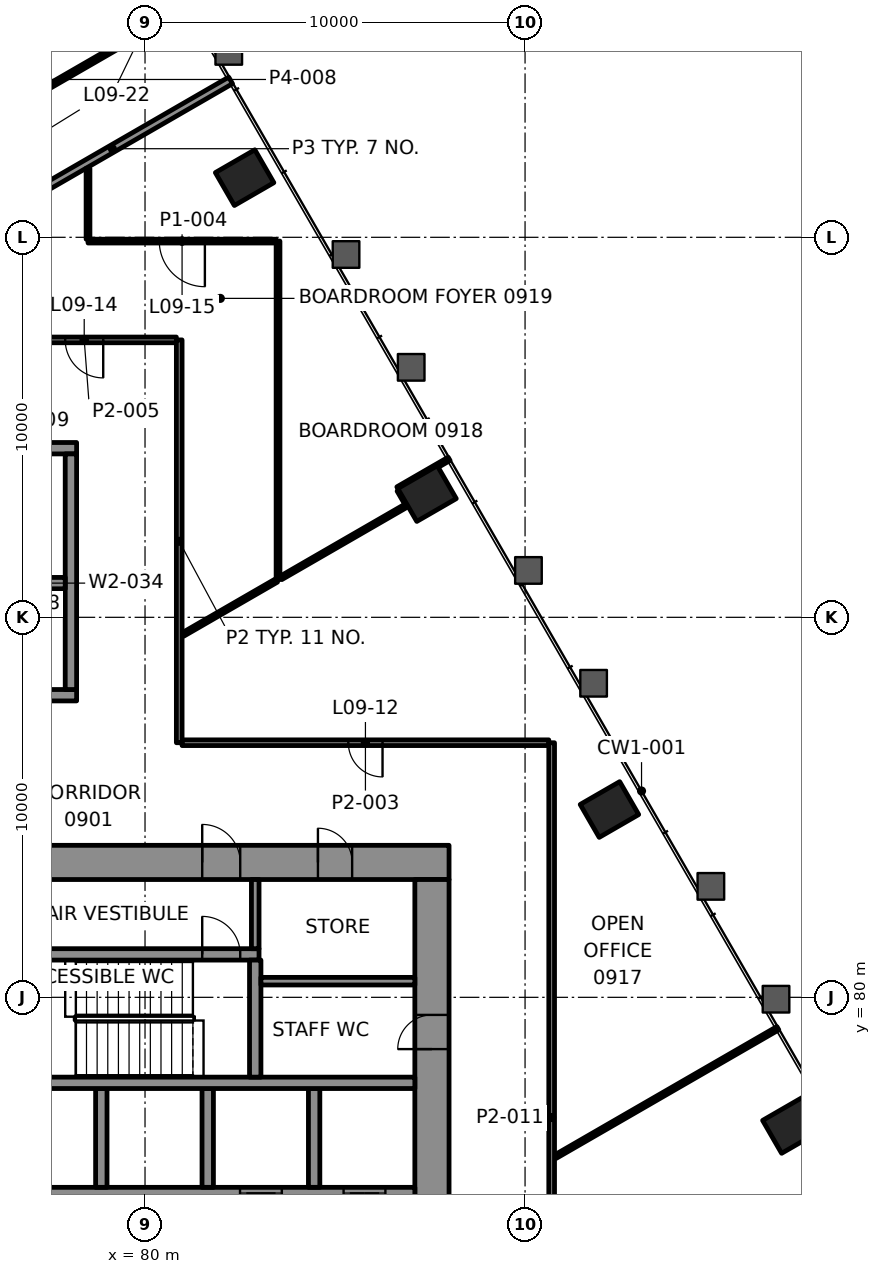
"""IFC4 building model, lengths in metres.
Left out: names, types, materials, properties, quantities, classifications, styles, units other than length and angle.
Written with IfcOpenShell. Run it as: python <this file> out.ifc"""

import sys

from ifc_helpers import new_model, si_unit, direction, frame, frame_2d, origin, origin_2d, place, context, subcontext, project, spatial, rectangle, extrude, element, fill, save


model = new_model("IFC4")
c1 = context("Model", 3, precision=1e-05, world=origin(), true_north=direction((0.0, 1.0)))
c2 = subcontext(c1, "Body", "Model", "MODEL_VIEW")
j1 = project(units=[si_unit("LENGTHUNIT", "METRE"), si_unit("PLANEANGLEUNIT", "RADIAN")], contexts=[c1])
p1 = place(None, origin())
s1 = spatial("IfcSite", under=j1, at=p1, CompositionType="ELEMENT")
p2 = place(p1, origin())
s2 = spatial("IfcBuilding", under=s1, at=p2, CompositionType="ELEMENT")
p3 = place(p2, frame((0.0, 0.0, 44.2)))
s3 = spatial("IfcBuildingStorey", under=s2, at=p3, CompositionType="ELEMENT", Elevation=44.2)
for number, where, z_axis, x_axis in (
    (1, (97.021, 76.628, -0.0), (0.0, 0.0, 1.0), (-0.5, 0.866, 0.0)),
    (2, (92.22, 84.942, -0.0), (0.0, 0.0, 1.0), (-0.5, 0.866, 0.0)),
    (3, (87.421, 93.256, -0.0), (0.0, 0.0, 1.0), (-0.5, 0.866, 0.0)),
    (4, (82.621, 101.57, -0.0), (0.0, 0.0, 1.0), (-0.5, 0.866, 0.0)),
):
    element("IfcColumn", number, at=place(p3, frame(where, z_axis=z_axis, x_axis=x_axis)), inside=s3, PredefinedType="COLUMN", context=c2, shape_type="SweptSolid", body=[
        extrude(rectangle(XDim=1.0, YDim=1.2, at=origin_2d()), origin(), (0.0, 0.0, 1.0), 4.2),
    ])
p4 = place(p3, frame((62.9, 83.55, 0.0), z_axis=(0.0, 0.0, 1.0), x_axis=(1.0, 0.0, 0.0)))
e5 = element("IfcWall", 5, at=p4, inside=s3, PredefinedType="SHEAR", context=c2, shape_type="SweptSolid", body=[
    extrude(rectangle(XDim=25.1, YDim=0.9, at=frame_2d((12.55, 0.0))), origin(), (0.0, 0.0, 1.0), 4.0),
])
p5 = place(p4, frame((4.795, 0.0, 0.0)))
e6 = element("IfcOpeningElement", 6, at=p5, cuts=e5, PredefinedType="OPENING", context=c2, shape_type="SweptSolid", body=[
    extrude(rectangle(XDim=1.0, YDim=2.1, at=frame_2d((0.5, 1.05))), frame((0.0, 0.46, 0.0), z_axis=(0.0, -1.0, 0.0), x_axis=(1.0, 0.0, 0.0)), (0.0, 0.0, 1.0), 0.92),
])
p6 = place(p4, frame((18.605, 0.0, 0.0)))
e7 = element("IfcOpeningElement", 7, at=p6, cuts=e5, PredefinedType="OPENING", context=c2, shape_type="SweptSolid", body=[
    extrude(rectangle(XDim=1.0, YDim=2.1, at=frame_2d((0.5, 1.05))), frame((0.0, 0.46, 0.0), z_axis=(0.0, -1.0, 0.0), x_axis=(1.0, 0.0, 0.0)), (0.0, 0.0, 1.0), 0.92),
])
p7 = place(p4, frame((2.55, 0.0, 0.0)))
e8 = element("IfcOpeningElement", 8, at=p7, cuts=e5, PredefinedType="OPENING", context=c2, shape_type="SweptSolid", body=[
    extrude(rectangle(XDim=0.9, YDim=2.1, at=frame_2d((0.45, 1.05))), frame((0.0, 0.46, 0.0), z_axis=(0.0, -1.0, 0.0), x_axis=(1.0, 0.0, 0.0)), (0.0, 0.0, 1.0), 0.92),
])
p8 = place(p4, frame((11.75, 0.0, 0.0)))
e9 = element("IfcOpeningElement", 9, at=p8, cuts=e5, PredefinedType="OPENING", context=c2, shape_type="SweptSolid", body=[
    extrude(rectangle(XDim=0.9, YDim=2.1, at=frame_2d((0.45, 1.05))), frame((0.0, 0.46, 0.0), z_axis=(0.0, -1.0, 0.0), x_axis=(1.0, 0.0, 0.0)), (0.0, 0.0, 1.0), 0.92),
])
p9 = place(p4, frame((21.65, 0.0, 0.0)))
e10 = element("IfcOpeningElement", 10, at=p9, cuts=e5, PredefinedType="OPENING", context=c2, shape_type="SweptSolid", body=[
    extrude(rectangle(XDim=0.9, YDim=2.1, at=frame_2d((0.45, 1.05))), frame((0.0, 0.46, 0.0), z_axis=(0.0, -1.0, 0.0), x_axis=(1.0, 0.0, 0.0)), (0.0, 0.0, 1.0), 0.92),
])
p10 = place(p3, frame((87.55, 66.9, 0.0), z_axis=(0.0, 0.0, 1.0), x_axis=(0.0, 1.0, 0.0)))
e11 = element("IfcWall", 11, at=p10, inside=s3, PredefinedType="SHEAR", context=c2, shape_type="SweptSolid", body=[
    extrude(rectangle(XDim=16.2, YDim=0.9, at=frame_2d((8.1, 0.0))), origin(), (0.0, 0.0, 1.0), 4.0),
])
p11 = place(p10, frame((5.5, 0.0, 0.0)))
e12 = element("IfcOpeningElement", 12, at=p11, cuts=e11, PredefinedType="OPENING", context=c2, shape_type="SweptSolid", body=[
    extrude(rectangle(XDim=1.8, YDim=2.1, at=frame_2d((0.9, 1.05))), frame((0.0, 0.46, 0.0), z_axis=(0.0, -1.0, 0.0), x_axis=(1.0, 0.0, 0.0)), (0.0, 0.0, 1.0), 0.92),
])
p12 = place(p10, frame((11.738, 0.0, 0.0)))
e13 = element("IfcOpeningElement", 13, at=p12, cuts=e11, PredefinedType="OPENING", context=c2, shape_type="SweptSolid", body=[
    extrude(rectangle(XDim=0.9, YDim=2.1, at=frame_2d((0.45, 1.05))), frame((0.0, 0.46, 0.0), z_axis=(0.0, -1.0, 0.0), x_axis=(1.0, 0.0, 0.0)), (0.0, 0.0, 1.0), 0.92),
])
p13 = place(p3, frame((70.3, 74.85, 0.0), z_axis=(0.0, 0.0, 1.0), x_axis=(1.0, 0.0, 0.0)))
e14 = element("IfcWall", 14, at=p13, inside=s3, PredefinedType="SHEAR", context=c2, shape_type="SweptSolid", body=[
    extrude(rectangle(XDim=16.8, YDim=0.3, at=frame_2d((8.4, 0.0))), origin(), (0.0, 0.0, 1.0), 4.0),
])
p14 = place(p13, frame((3.8, 0.0, 0.0)))
e15 = element("IfcOpeningElement", 15, at=p14, cuts=e14, PredefinedType="OPENING", context=c2, shape_type="SweptSolid", body=[
    extrude(rectangle(XDim=1.1, YDim=2.1, at=frame_2d((0.55, 1.05))), frame((0.0, 0.16, 0.0), z_axis=(0.0, -1.0, 0.0), x_axis=(1.0, 0.0, 0.0)), (0.0, 0.0, 1.0), 0.32),
])
p15 = place(p13, frame((12.2, 0.0, 0.0)))
e16 = element("IfcOpeningElement", 16, at=p15, cuts=e14, PredefinedType="OPENING", context=c2, shape_type="SweptSolid", body=[
    extrude(rectangle(XDim=1.1, YDim=2.1, at=frame_2d((0.55, 1.05))), frame((0.0, 0.16, 0.0), z_axis=(0.0, -1.0, 0.0), x_axis=(1.0, 0.0, 0.0)), (0.0, 0.0, 1.0), 0.32),
])
p16 = place(p13, frame((14.925, 0.0, 0.0)))
e17 = element("IfcOpeningElement", 17, at=p16, cuts=e14, PredefinedType="OPENING", context=c2, shape_type="SweptSolid", body=[
    extrude(rectangle(XDim=1.1, YDim=2.1, at=frame_2d((0.55, 1.05))), frame((0.0, 0.16, 0.0), z_axis=(0.0, -1.0, 0.0), x_axis=(1.0, 0.0, 0.0)), (0.0, 0.0, 1.0), 0.32),
])
for number, where, z_axis, x_axis in (
    (18, (78.85, 75.0, 0.0), (0.0, 0.0, 1.0), (0.0, 1.0, 0.0)),
    (19, (81.65, 75.0, 0.0), (0.0, 0.0, 1.0), (0.0, 1.0, 0.0)),
    (20, (84.45, 75.0, 0.0), (0.0, 0.0, 1.0), (0.0, 1.0, 0.0)),
):
    element("IfcWall", number, at=place(p3, frame(where, z_axis=z_axis, x_axis=x_axis)), inside=s3, PredefinedType="SHEAR", context=c2, shape_type="SweptSolid", body=[
        extrude(rectangle(XDim=2.6, YDim=0.3, at=frame_2d((1.3, 0.0))), origin(), (0.0, 0.0, 1.0), 4.0),
    ])
p17 = place(p3, frame((64.35, 77.75, 0.0), z_axis=(0.0, 0.0, 1.0), x_axis=(1.0, 0.0, 0.0)))
e21 = element("IfcWall", 21, at=p17, inside=s3, PredefinedType="SHEAR", context=c2, shape_type="SweptSolid", body=[
    extrude(rectangle(XDim=22.75, YDim=0.3, at=frame_2d((11.375, 0.0))), origin(), (0.0, 0.0, 1.0), 4.0),
])
p18 = place(p17, frame((3.345, 0.0, 0.0)))
e22 = element("IfcOpeningElement", 22, at=p18, cuts=e21, PredefinedType="OPENING", context=c2, shape_type="SweptSolid", body=[
    extrude(rectangle(XDim=1.0, YDim=2.1, at=frame_2d((0.5, 1.05))), frame((0.0, 0.16, 0.0), z_axis=(0.0, -1.0, 0.0), x_axis=(1.0, 0.0, 0.0)), (0.0, 0.0, 1.0), 0.32),
])
p19 = place(p3, frame((76.14, 81.13, 0.0), z_axis=(0.0, 0.0, 1.0), x_axis=(1.0, 0.0, 0.0)))
e23 = element("IfcWall", 23, at=p19, inside=s3, PredefinedType="SHEAR", context=c2, shape_type="SweptSolid", body=[
    extrude(rectangle(XDim=6.86, YDim=0.3, at=frame_2d((3.43, 0.0))), origin(), (0.0, 0.0, 1.0), 4.0),
])
p20 = place(p19, frame((5.365, 0.0, 0.0)))
e24 = element("IfcOpeningElement", 24, at=p20, cuts=e23, PredefinedType="OPENING", context=c2, shape_type="SweptSolid", body=[
    extrude(rectangle(XDim=1.0, YDim=2.1, at=frame_2d((0.5, 1.05))), frame((0.0, 0.16, 0.0), z_axis=(0.0, -1.0, 0.0), x_axis=(1.0, 0.0, 0.0)), (0.0, 0.0, 1.0), 0.32),
])
p21 = place(p3, frame((82.9, 77.9, 0.0), z_axis=(0.0, 0.0, 1.0), x_axis=(0.0, 1.0, 0.0)))
e25 = element("IfcWall", 25, at=p21, inside=s3, PredefinedType="SHEAR", context=c2, shape_type="SweptSolid", body=[
    extrude(rectangle(XDim=3.08, YDim=0.3, at=frame_2d((1.54, 0.0))), origin(), (0.0, 0.0, 1.0), 4.0),
])
p22 = place(p3, frame((71.8, 87.95, 0.0), z_axis=(0.0, 0.0, 1.0), x_axis=(1.0, 0.0, 0.0)))
e26 = element("IfcWall", 26, at=p22, inside=s3, PredefinedType="SHEAR", context=c2, shape_type="SweptSolid", body=[
    extrude(rectangle(XDim=6.4, YDim=0.3, at=frame_2d((3.2, 0.0))), origin(), (0.0, 0.0, 1.0), 4.0),
])
p23 = place(p22, frame((1.325, 0.0, 0.0)))
e27 = element("IfcOpeningElement", 27, at=p23, cuts=e26, PredefinedType="OPENING", context=c2, shape_type="SweptSolid", body=[
    extrude(rectangle(XDim=1.0, YDim=2.1, at=frame_2d((0.5, 1.05))), frame((0.0, 0.16, 0.0), z_axis=(0.0, -1.0, 0.0), x_axis=(1.0, 0.0, 0.0)), (0.0, 0.0, 1.0), 0.32),
])
p24 = place(p22, frame((4.125, 0.0, 0.0)))
e28 = element("IfcOpeningElement", 28, at=p24, cuts=e26, PredefinedType="OPENING", context=c2, shape_type="SweptSolid", body=[
    extrude(rectangle(XDim=1.2, YDim=2.1, at=frame_2d((0.6, 1.05))), frame((0.0, 0.16, 0.0), z_axis=(0.0, -1.0, 0.0), x_axis=(1.0, 0.0, 0.0)), (0.0, 0.0, 1.0), 0.32),
])
p25 = place(p3, frame((71.8, 94.45, 0.0), z_axis=(0.0, 0.0, 1.0), x_axis=(1.0, 0.0, 0.0)))
e29 = element("IfcWall", 29, at=p25, inside=s3, PredefinedType="SHEAR", context=c2, shape_type="SweptSolid", body=[
    extrude(rectangle(XDim=6.4, YDim=0.3, at=frame_2d((3.2, 0.0))), origin(), (0.0, 0.0, 1.0), 4.0),
])
p26 = place(p3, frame((78.05, 88.1, 0.0), z_axis=(0.0, 0.0, 1.0), x_axis=(0.0, 1.0, 0.0)))
e30 = element("IfcWall", 30, at=p26, inside=s3, PredefinedType="SHEAR", context=c2, shape_type="SweptSolid", body=[
    extrude(rectangle(XDim=6.2, YDim=0.3, at=frame_2d((3.1, 0.0))), origin(), (0.0, 0.0, 1.0), 4.0),
])
p27 = place(p3, frame((75.3, 90.9, 0.0), z_axis=(0.0, 0.0, 1.0), x_axis=(1.0, 0.0, 0.0)))
e31 = element("IfcWall", 31, at=p27, inside=s3, PredefinedType="SHEAR", context=c2, shape_type="SweptSolid", body=[
    extrude(rectangle(XDim=2.6, YDim=0.3, at=frame_2d((1.3, 0.0))), origin(), (0.0, 0.0, 1.0), 4.0),
])
p28 = place(p27, frame((0.675, 0.0, 0.0)))
e32 = element("IfcOpeningElement", 32, at=p28, cuts=e31, PredefinedType="OPENING", context=c2, shape_type="SweptSolid", body=[
    extrude(rectangle(XDim=1.1, YDim=2.1, at=frame_2d((0.55, 1.05))), frame((0.0, 0.16, 0.0), z_axis=(0.0, -1.0, 0.0), x_axis=(1.0, 0.0, 0.0)), (0.0, 0.0, 1.0), 0.32),
])
p29 = place(p3, frame((90.625, 86.7, 0.0), z_axis=(0.0, 0.0, 1.0), x_axis=(-1.0, 0.0, 0.0)))
e33 = element("IfcWall", 33, at=p29, inside=s3, PredefinedType="PARTITIONING", context=c2, shape_type="SweptSolid", body=[
    extrude(rectangle(XDim=9.649, YDim=0.15, at=frame_2d((4.825, 0.0))), origin(), (0.0, 0.0, 1.0), 3.4),
])
p30 = place(p29, frame((4.375, 0.0, 0.0)))
e34 = element("IfcOpeningElement", 34, at=p30, cuts=e33, PredefinedType="OPENING", context=c2, shape_type="SweptSolid", body=[
    extrude(rectangle(XDim=0.9, YDim=2.1, at=frame_2d((0.45, 1.05))), frame((0.0, 0.085, 0.0), z_axis=(0.0, -1.0, 0.0), x_axis=(1.0, 0.0, 0.0)), (0.0, 0.0, 1.0), 0.17),
])
p31 = place(p3, frame((80.825, 97.3, 0.0), z_axis=(0.0, 0.0, 1.0), x_axis=(-1.0, 0.0, 0.0)))
e35 = element("IfcWall", 35, at=p31, inside=s3, PredefinedType="PARTITIONING", context=c2, shape_type="SweptSolid", body=[
    extrude(rectangle(XDim=4.85, YDim=0.15, at=frame_2d((2.425, 0.0))), origin(), (0.0, 0.0, 1.0), 3.4),
])
p32 = place(p31, frame((1.925, 0.0, 0.0)))
e36 = element("IfcOpeningElement", 36, at=p32, cuts=e35, PredefinedType="OPENING", context=c2, shape_type="SweptSolid", body=[
    extrude(rectangle(XDim=1.0, YDim=2.1, at=frame_2d((0.5, 1.05))), frame((0.0, 0.085, 0.0), z_axis=(0.0, -1.0, 0.0), x_axis=(1.0, 0.0, 0.0)), (0.0, 0.0, 1.0), 0.17),
])
p33 = place(p3, frame((83.45, 99.9, 0.0), z_axis=(0.0, 0.0, 1.0), x_axis=(-1.0, 0.0, 0.0)))
e37 = element("IfcWall", 37, at=p33, inside=s3, PredefinedType="PARTITIONING", context=c2, shape_type="SweptSolid", body=[
    extrude(rectangle(XDim=4.95, YDim=0.1, at=frame_2d((2.475, 0.0))), origin(), (0.0, 0.0, 1.0), 3.165),
])
p34 = place(p33, frame((1.875, 0.0, 0.0)))
e38 = element("IfcOpeningElement", 38, at=p34, cuts=e37, PredefinedType="OPENING", context=c2, shape_type="SweptSolid", body=[
    extrude(rectangle(XDim=1.2, YDim=2.1, at=frame_2d((0.6, 1.05))), frame((0.0, 0.06, 0.0), z_axis=(0.0, -1.0, 0.0), x_axis=(1.0, 0.0, 0.0)), (0.0, 0.0, 1.0), 0.12),
])
p35 = place(p3, frame((90.801, 75.809, 0.0), z_axis=(0.0, 0.0, 1.0), x_axis=(0.866012872937, 0.500021703436, 0.0)))
e39 = element("IfcWall", 39, at=p35, inside=s3, PredefinedType="PARTITIONING", context=c2, shape_type="SweptSolid", body=[
    extrude(rectangle(XDim=6.756, YDim=0.1, at=frame_2d((3.378, 0.0))), origin(), (0.0, 0.0, 1.0), 3.165),
])
p36 = place(p3, frame((81.001, 89.55, 0.0), z_axis=(0.0, 0.0, 1.0), x_axis=(0.866019653938, 0.500009958894, 0.0)))
e40 = element("IfcWall", 40, at=p36, inside=s3, PredefinedType="PARTITIONING", context=c2, shape_type="SweptSolid", body=[
    extrude(rectangle(XDim=2.842, YDim=0.1, at=frame_2d((1.421, 0.0))), origin(), (0.0, 0.0, 1.0), 3.4),
])
p37 = place(p3, frame((86.651, 93.389, 0.0), z_axis=(0.0, 0.0, 1.0), x_axis=(0.866018739521, 0.500011542666, 0.0)))
e41 = element("IfcWall", 41, at=p37, inside=s3, PredefinedType="PARTITIONING", context=c2, shape_type="SweptSolid", body=[
    extrude(rectangle(XDim=1.56, YDim=0.1, at=frame_2d((0.78, 0.0))), origin(), (0.0, 0.0, 1.0), 3.165),
])
p38 = place(p3, frame((76.027, 100.534, 0.0), z_axis=(0.0, 0.0, 1.0), x_axis=(0.866029480033, 0.499992939664, 0.0)))
e42 = element("IfcWall", 42, at=p38, inside=s3, PredefinedType="PARTITIONING", context=c2, shape_type="SweptSolid", body=[
    extrude(rectangle(XDim=7.188, YDim=0.2, at=frame_2d((3.594, 0.0))), origin(), (0.0, 0.0, 1.0), 3.4),
])
p39 = place(p3, frame((77.445, 103.956, 0.0), z_axis=(0.0, 0.0, 1.0), x_axis=(0.86599994119, 0.500044099915, 0.0)))
e43 = element("IfcWall", 43, at=p39, inside=s3, PredefinedType="PARTITIONING", context=c2, shape_type="SweptSolid", body=[
    extrude(rectangle(XDim=3.066, YDim=0.12, at=frame_2d((1.533, 0.0))), origin(), (0.0, 0.0, 1.0), 3.4),
])
p40 = place(p3, frame((90.7, 86.699, 0.0), z_axis=(0.0, 0.0, 1.0), x_axis=(0.0, -1.0, 0.0)))
e44 = element("IfcWall", 44, at=p40, inside=s3, PredefinedType="PARTITIONING", context=c2, shape_type="SweptSolid", body=[
    extrude(rectangle(XDim=19.725, YDim=0.15, at=frame_2d((9.862, 0.0))), origin(), (0.0, 0.0, 1.0), 3.4),
])
p41 = place(p40, frame((14.785, 0.0, 0.0)))
e45 = element("IfcOpeningElement", 45, at=p41, cuts=e44, PredefinedType="OPENING", context=c2, shape_type="SweptSolid", body=[
    extrude(rectangle(XDim=0.9, YDim=2.1, at=frame_2d((0.45, 1.05))), frame((0.0, 0.085, 0.0), z_axis=(0.0, -1.0, 0.0), x_axis=(1.0, 0.0, 0.0)), (0.0, 0.0, 1.0), 0.17),
])
p42 = place(p3, frame((83.5, 90.993, 0.0), z_axis=(0.0, 0.0, 1.0), x_axis=(0.0, 1.0, 0.0)))
e46 = element("IfcWall", 46, at=p42, inside=s3, PredefinedType="PARTITIONING", context=c2, shape_type="SweptSolid", body=[
    extrude(rectangle(XDim=8.907, YDim=0.1, at=frame_2d((4.454, 0.0))), origin(), (0.0, 0.0, 1.0), 3.165),
])
p43 = place(p3, frame((80.9, 86.7, 0.0), z_axis=(0.0, 0.0, 1.0), x_axis=(0.0, 1.0, 0.0)))
e47 = element("IfcWall", 47, at=p43, inside=s3, PredefinedType="PARTITIONING", context=c2, shape_type="SweptSolid", body=[
    extrude(rectangle(XDim=10.6, YDim=0.15, at=frame_2d((5.3, 0.0))), origin(), (0.0, 0.0, 1.0), 3.4),
])
p44 = place(p3, frame((78.5, 99.95, 0.0), z_axis=(0.0, 0.0, 1.0), x_axis=(0.0, 1.0, 0.0)))
e48 = element("IfcWall", 48, at=p44, inside=s3, PredefinedType="PARTITIONING", context=c2, shape_type="SweptSolid", body=[
    extrude(rectangle(XDim=1.867, YDim=0.1, at=frame_2d((0.934, 0.0))), origin(), (0.0, 0.0, 1.0), 3.4),
])
p45 = place(p3, frame((86.876, 93.0, 0.0), z_axis=(0.0, 0.0, 1.0), x_axis=(-0.500409926597, 0.865788603161, 0.0)))
e49 = element("IfcWall", 49, at=p45, inside=s3, PredefinedType="PARTITIONING", context=c2, shape_type="SweptSolid", body=[
    extrude(rectangle(XDim=0.4, YDim=0.1, at=frame_2d((0.2, 0.0))), origin(), (0.0, 0.0, 1.0), 3.4),
])
p46 = place(p3, frame((83.575, 91.036, 0.0), z_axis=(0.0, 0.0, 1.0), x_axis=(0.866032607753, 0.499987522153, 0.0)))
e50 = element("IfcWall", 50, at=p46, inside=s3, PredefinedType="PARTITIONING", context=c2, shape_type="SweptSolid", body=[
    extrude(rectangle(XDim=3.8, YDim=0.1, at=frame_2d((1.9, 0.0))), origin(), (0.0, 0.0, 1.0), 3.4),
])
p47 = place(p3, frame((83.05, 80.425, 0.0), z_axis=(0.0, 0.0, 1.0), x_axis=(1.0, 0.0, 0.0)))
e51 = element("IfcWall", 51, at=p47, inside=s3, PredefinedType="PARTITIONING", context=c2, shape_type="SweptSolid", body=[
    extrude(rectangle(XDim=4.05, YDim=0.2, at=frame_2d((2.025, 0.0))), origin(), (0.0, 0.0, 1.0), 4.0),
])
p48 = place(p3, frame((82.9, 81.28, 0.0), z_axis=(0.0, 0.0, 1.0), x_axis=(0.0, 1.0, 0.0)))
e52 = element("IfcWall", 52, at=p48, inside=s3, PredefinedType="PARTITIONING", context=c2, shape_type="SweptSolid", body=[
    extrude(rectangle(XDim=1.82, YDim=0.2, at=frame_2d((0.91, 0.0))), origin(), (0.0, 0.0, 1.0), 4.0),
])
p49 = place(p30, origin())
e53 = element("IfcDoor", 53, at=p49, inside=s3, OperationType="SINGLE_SWING_LEFT", PredefinedType="DOOR", context=c2, shape_type="SweptSolid", body=[
    extrude(rectangle(XDim=0.9, YDim=2.1, at=frame_2d((0.45, 1.05))), frame((0.0, 0.025, 0.0), z_axis=(0.0, -1.0, 0.0), x_axis=(1.0, 0.0, 0.0)), (0.0, 0.0, 1.0), 0.05),
])
fill(e34, e53)
p50 = place(p32, origin())
e54 = element("IfcDoor", 54, at=p50, inside=s3, OperationType="SINGLE_SWING_LEFT", PredefinedType="DOOR", context=c2, shape_type="SweptSolid", body=[
    extrude(rectangle(XDim=1.0, YDim=2.1, at=frame_2d((0.5, 1.05))), frame((0.0, 0.025, 0.0), z_axis=(0.0, -1.0, 0.0), x_axis=(1.0, 0.0, 0.0)), (0.0, 0.0, 1.0), 0.05),
])
fill(e36, e54)
p51 = place(p34, origin())
e55 = element("IfcDoor", 55, at=p51, inside=s3, OperationType="DOUBLE_DOOR_SINGLE_SWING", PredefinedType="DOOR", context=c2, shape_type="SweptSolid", body=[
    extrude(rectangle(XDim=1.2, YDim=2.1, at=frame_2d((0.6, 1.05))), frame((0.0, 0.025, 0.0), z_axis=(0.0, -1.0, 0.0), x_axis=(1.0, 0.0, 0.0)), (0.0, 0.0, 1.0), 0.05),
])
fill(e38, e55)
p52 = place(p15, origin())
e56 = element("IfcDoor", 56, at=p52, inside=s3, OperationType="DOUBLE_DOOR_SLIDING", PredefinedType="DOOR", context=c2, shape_type="SweptSolid", body=[
    extrude(rectangle(XDim=1.1, YDim=2.1, at=frame_2d((0.55, 1.05))), frame((0.0, 0.025, 0.0), z_axis=(0.0, -1.0, 0.0), x_axis=(1.0, 0.0, 0.0)), (0.0, 0.0, 1.0), 0.05),
])
fill(e16, e56)
p53 = place(p16, origin())
e57 = element("IfcDoor", 57, at=p53, inside=s3, OperationType="DOUBLE_DOOR_SLIDING", PredefinedType="DOOR", context=c2, shape_type="SweptSolid", body=[
    extrude(rectangle(XDim=1.1, YDim=2.1, at=frame_2d((0.55, 1.05))), frame((0.0, 0.025, 0.0), z_axis=(0.0, -1.0, 0.0), x_axis=(1.0, 0.0, 0.0)), (0.0, 0.0, 1.0), 0.05),
])
fill(e17, e57)
p54 = place(p20, origin())
e58 = element("IfcDoor", 58, at=p54, inside=s3, OperationType="SINGLE_SWING_RIGHT", PredefinedType="DOOR", context=c2, shape_type="SweptSolid", body=[
    extrude(rectangle(XDim=1.0, YDim=2.1, at=frame_2d((0.5, 1.05))), frame((0.0, 0.025, 0.0), z_axis=(0.0, -1.0, 0.0), x_axis=(1.0, 0.0, 0.0)), (0.0, 0.0, 1.0), 0.05),
])
fill(e24, e58)
p55 = place(p6, origin())
e59 = element("IfcDoor", 59, at=p55, inside=s3, OperationType="SINGLE_SWING_LEFT", PredefinedType="DOOR", context=c2, shape_type="SweptSolid", body=[
    extrude(rectangle(XDim=1.0, YDim=2.1, at=frame_2d((0.5, 1.05))), frame((0.0, 0.17, 0.0), z_axis=(0.0, -1.0, 0.0), x_axis=(1.0, 0.0, 0.0)), (0.0, 0.0, 1.0), 0.34),
])
fill(e7, e59)
p56 = place(p12, origin())
e60 = element("IfcDoor", 60, at=p56, inside=s3, OperationType="SINGLE_SWING_RIGHT", PredefinedType="DOOR", context=c2, shape_type="SweptSolid", body=[
    extrude(rectangle(XDim=0.9, YDim=2.1, at=frame_2d((0.45, 1.05))), frame((0.0, 0.17, 0.0), z_axis=(0.0, -1.0, 0.0), x_axis=(1.0, 0.0, 0.0)), (0.0, 0.0, 1.0), 0.34),
])
fill(e13, e60)
p57 = place(p9, origin())
e61 = element("IfcDoor", 61, at=p57, inside=s3, OperationType="SINGLE_SWING_LEFT", PredefinedType="DOOR", context=c2, shape_type="SweptSolid", body=[
    extrude(rectangle(XDim=0.9, YDim=2.1, at=frame_2d((0.45, 1.05))), frame((0.0, 0.17, 0.0), z_axis=(0.0, -1.0, 0.0), x_axis=(1.0, 0.0, 0.0)), (0.0, 0.0, 1.0), 0.34),
])
fill(e10, e61)
save(model, sys.argv[1])
